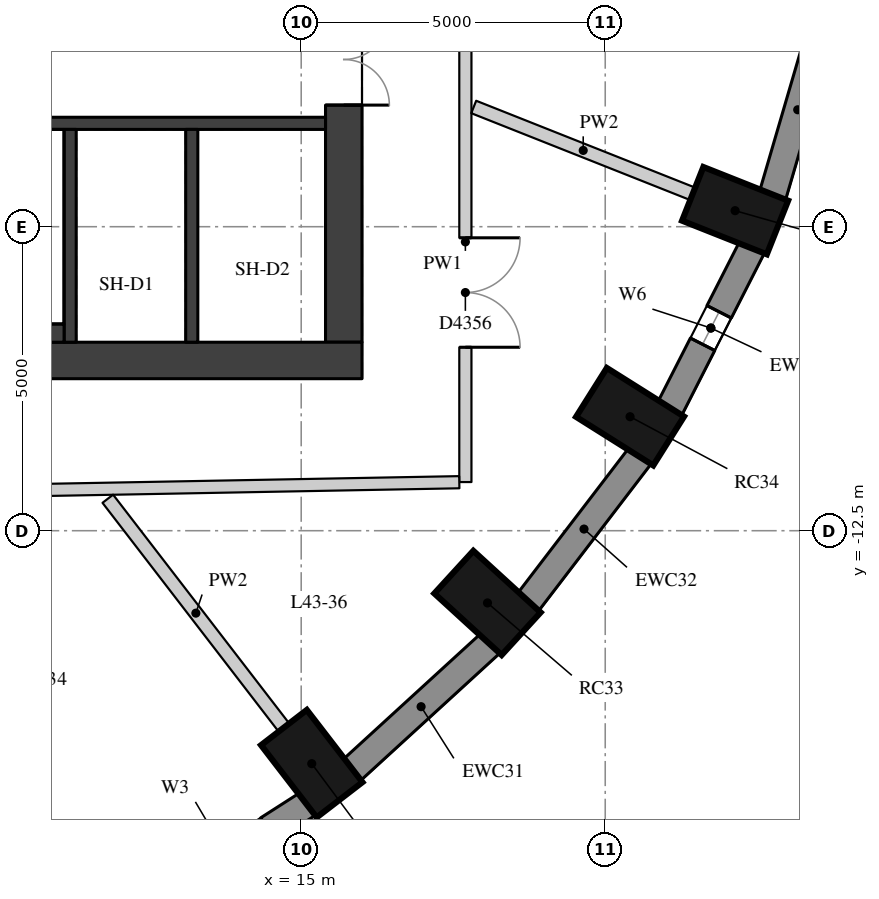
"""IFC4 building model, lengths in metres.
Left out: names, types, materials, properties, quantities, classifications, styles, units other than length and angle.
Written with IfcOpenShell. Run it as: python <this file> out.ifc"""

import sys

from ifc_helpers import new_model, si_unit, direction, frame, frame_2d, origin, origin_2d, place, context, subcontext, project, spatial, rectangle, extrude, element, fill, save


model = new_model("IFC4")
c1 = context("Model", 3, precision=1e-05, world=origin(), true_north=direction((0.0, 1.0)))
c2 = subcontext(c1, "Body", "Model", "MODEL_VIEW")
j1 = project(units=[si_unit("LENGTHUNIT", "METRE"), si_unit("PLANEANGLEUNIT", "RADIAN")], contexts=[c1])
p1 = place(None, origin())
s1 = spatial("IfcSite", under=j1, at=p1, CompositionType="ELEMENT")
p2 = place(p1, origin())
s2 = spatial("IfcBuilding", under=s1, at=p2, CompositionType="ELEMENT")
p3 = place(p2, frame((0.0, 0.0, 155.0)))
s3 = spatial("IfcBuildingStorey", under=s2, at=p3, CompositionType="ELEMENT", Elevation=155.0)
for number, where, z_axis, x_axis in (
    (1, (15.173, -16.332, 0.0), (0.0, 0.0, 1.0), (0.61, -0.792, 0.0)),
    (2, (18.064, -13.688, 0.0), (0.0, 0.0, 1.0), (0.738, -0.675, 0.0)),
    (3, (20.408, -10.625, 0.0), (0.0, 0.0, 1.0), (0.846, -0.533, 0.0)),
    (4, (22.136, -7.236, 0.0), (0.0, 0.0, 1.0), (0.93, -0.369, 0.0)),
):
    element("IfcColumn", number, at=place(p3, frame(where, z_axis=z_axis, x_axis=x_axis)), inside=s3, PredefinedType="COLUMN", context=c2, shape_type="SweptSolid", body=[
        extrude(rectangle(XDim=1.5, YDim=0.95, at=origin_2d()), origin(), (0.0, 0.0, 1.0), 3.3),
    ])
p4 = place(p3, frame((12.455, -18.693, 0.0), z_axis=(0.0, 0.0, 1.0), x_axis=(0.842065914439, 0.539374633943, 0.0)))
e5 = element("IfcWall", 5, at=p4, inside=s3, PredefinedType="SOLIDWALL", context=c2, shape_type="SweptSolid", body=[
    extrude(rectangle(XDim=3.151, YDim=0.45, at=frame_2d((1.576, 0.0))), origin(), (0.0, 0.0, 1.0), 3.02),
])
p5 = place(p4, frame((0.776, 0.0, 0.4)))
e6 = element("IfcOpeningElement", 6, at=p5, cuts=e5, PredefinedType="OPENING", context=c2, shape_type="SweptSolid", body=[
    extrude(rectangle(XDim=1.6, YDim=1.75, at=frame_2d((0.8, 0.875))), frame((0.0, 0.235, 0.0), z_axis=(0.0, -1.0, 0.0), x_axis=(1.0, 0.0, 0.0)), (0.0, 0.0, 1.0), 0.47),
])
p6 = place(p3, frame((15.83, -16.439, 0.0), z_axis=(0.0, 0.0, 1.0), x_axis=(0.737808755941, 0.675009807082, 0.0)))
e7 = element("IfcWall", 7, at=p6, inside=s3, PredefinedType="SOLIDWALL", context=c2, shape_type="SweptSolid", body=[
    extrude(rectangle(XDim=3.094, YDim=0.45, at=frame_2d((1.547, 0.0))), origin(), (0.0, 0.0, 1.0), 3.02),
])
p7 = place(p3, frame((18.728, -13.679, 0.0), z_axis=(0.0, 0.0, 1.0), x_axis=(0.607817056371, 0.794077090706, 0.0)))
e8 = element("IfcWall", 8, at=p7, inside=s3, PredefinedType="SOLIDWALL", context=c2, shape_type="SweptSolid", body=[
    extrude(rectangle(XDim=3.037, YDim=0.45, at=frame_2d((1.519, 0.0))), origin(), (0.0, 0.0, 1.0), 3.02),
])
p8 = place(p3, frame((21.059, -10.497, 0.0), z_axis=(0.0, 0.0, 1.0), x_axis=(0.454133999889, 0.890933392653, 0.0)))
e9 = element("IfcWall", 9, at=p8, inside=s3, PredefinedType="SOLIDWALL", context=c2, shape_type="SweptSolid", body=[
    extrude(rectangle(XDim=2.986, YDim=0.45, at=frame_2d((1.493, 0.0))), origin(), (0.0, 0.0, 1.0), 3.02),
])
p9 = place(p8, frame((1.193, 0.0, 0.4)))
e10 = element("IfcOpeningElement", 10, at=p9, cuts=e9, PredefinedType="OPENING", context=c2, shape_type="SweptSolid", body=[
    extrude(rectangle(XDim=0.6, YDim=1.75, at=frame_2d((0.3, 0.875))), frame((0.0, 0.235, 0.0), z_axis=(0.0, -1.0, 0.0), x_axis=(1.0, 0.0, 0.0)), (0.0, 0.0, 1.0), 0.47),
])
p10 = place(p3, frame((22.751, -6.991, 0.0), z_axis=(0.0, 0.0, 1.0), x_axis=(0.281049481624, 0.959693278542, 0.0)))
e11 = element("IfcWall", 11, at=p10, inside=s3, PredefinedType="SOLIDWALL", context=c2, shape_type="SweptSolid", body=[
    extrude(rectangle(XDim=2.948, YDim=0.45, at=frame_2d((1.474, 0.0))), origin(), (0.0, 0.0, 1.0), 3.02),
])
p11 = place(p3, frame((15.7, -9.4, 0.0), z_axis=(0.0, 0.0, 1.0), x_axis=(0.0, 1.0, 0.0)))
e12 = element("IfcWall", 12, at=p11, inside=s3, PredefinedType="SHEAR", context=c2, shape_type="SweptSolid", body=[
    extrude(rectangle(XDim=18.8, YDim=0.6, at=frame_2d((9.4, 0.0))), origin(), (0.0, 0.0, 1.0), 3.02),
])
p12 = place(p11, frame((13.4, 0.0, 0.0)))
e13 = element("IfcOpeningElement", 13, at=p12, cuts=e12, PredefinedType="OPENING", context=c2, shape_type="SweptSolid", body=[
    extrude(rectangle(XDim=1.5, YDim=2.1, at=frame_2d((0.75, 1.05))), frame((0.0, 0.31, 0.0), z_axis=(0.0, -1.0, 0.0), x_axis=(1.0, 0.0, 0.0)), (0.0, 0.0, 1.0), 0.62),
])
p13 = place(p11, frame((3.9, 0.0, 0.0)))
e14 = element("IfcOpeningElement", 14, at=p13, cuts=e12, PredefinedType="OPENING", context=c2, shape_type="SweptSolid", body=[
    extrude(rectangle(XDim=1.5, YDim=2.1, at=frame_2d((0.75, 1.05))), frame((0.0, 0.31, 0.0), z_axis=(0.0, -1.0, 0.0), x_axis=(1.0, 0.0, 0.0)), (0.0, 0.0, 1.0), 0.62),
])
p14 = place(p3, frame((4.0, -9.7, 0.0), z_axis=(0.0, 0.0, 1.0), x_axis=(1.0, 0.0, 0.0)))
e15 = element("IfcWall", 15, at=p14, inside=s3, PredefinedType="SHEAR", context=c2, shape_type="SweptSolid", body=[
    extrude(rectangle(XDim=12.0, YDim=0.6, at=frame_2d((6.0, 0.0))), origin(), (0.0, 0.0, 1.0), 3.02),
])
p15 = place(p3, frame((4.6, -5.8, 0.0), z_axis=(0.0, 0.0, 1.0), x_axis=(1.0, 0.0, 0.0)))
e16 = element("IfcWall", 16, at=p15, inside=s3, PredefinedType="SHEAR", context=c2, shape_type="SweptSolid", body=[
    extrude(rectangle(XDim=10.8, YDim=0.2, at=frame_2d((5.4, 0.0))), origin(), (0.0, 0.0, 1.0), 3.02),
])
for number, where, z_axis, x_axis in (
    (17, (11.2, -9.4, 0.0), (0.0, 0.0, 1.0), (0.0, 1.0, 0.0)),
    (18, (13.2, -9.4, 0.0), (0.0, 0.0, 1.0), (0.0, 1.0, 0.0)),
):
    element("IfcWall", number, at=place(p3, frame(where, z_axis=z_axis, x_axis=x_axis)), inside=s3, PredefinedType="SHEAR", context=c2, shape_type="SweptSolid", body=[
        extrude(rectangle(XDim=3.5, YDim=0.2, at=frame_2d((1.75, 0.0))), origin(), (0.0, 0.0, 1.0), 3.02),
    ])
p16 = place(p3, frame((6.22, -9.25, 0.0), z_axis=(0.0, 0.0, 1.0), x_axis=(1.0, 0.0, 0.0)))
e19 = element("IfcWall", 19, at=p16, inside=s3, PredefinedType="PARTITIONING", context=c2, shape_type="SweptSolid", body=[
    extrude(rectangle(XDim=4.88, YDim=0.3, at=frame_2d((2.44, 0.0))), origin(), (0.0, 0.0, 1.0), 3.02),
])
p17 = place(p3, frame((17.7, -3.8, 0.0), z_axis=(0.0, 0.0, 1.0), x_axis=(0.0, -1.0, 0.0)))
e20 = element("IfcWall", 20, at=p17, inside=s3, PredefinedType="PARTITIONING", context=c2, shape_type="SweptSolid", body=[
    extrude(rectangle(XDim=7.9, YDim=0.2, at=frame_2d((3.95, 0.0))), origin(), (0.0, 0.0, 1.0), 3.02),
])
p18 = place(p17, frame((3.883, 0.0, 0.0)))
e21 = element("IfcOpeningElement", 21, at=p18, cuts=e20, PredefinedType="OPENING", context=c2, shape_type="SweptSolid", body=[
    extrude(rectangle(XDim=1.8, YDim=2.1, at=frame_2d((0.9, 1.05))), frame((0.0, 0.11, 0.0), z_axis=(0.0, -1.0, 0.0), x_axis=(1.0, 0.0, 0.0)), (0.0, 0.0, 1.0), 0.22),
])
p19 = place(p3, frame((17.6, -11.702, 0.0), z_axis=(0.0, 0.0, 1.0), x_axis=(-0.999825923551, -0.018658043723, 0.0)))
e22 = element("IfcWall", 22, at=p19, inside=s3, PredefinedType="PARTITIONING", context=c2, shape_type="SweptSolid", body=[
    extrude(rectangle(XDim=22.899, YDim=0.2, at=frame_2d((11.449, 0.0))), origin(), (0.0, 0.0, 1.0), 3.02),
])
p20 = place(p19, frame((20.729, 0.0, 0.0)))
e23 = element("IfcOpeningElement", 23, at=p20, cuts=e22, PredefinedType="OPENING", context=c2, shape_type="SweptSolid", body=[
    extrude(rectangle(XDim=1.8, YDim=2.1, at=frame_2d((0.9, 1.05))), frame((0.0, 0.11, 0.0), z_axis=(0.0, -1.0, 0.0), x_axis=(1.0, 0.0, 0.0)), (0.0, 0.0, 1.0), 0.22),
])
p21 = place(p19, frame((14.554, 0.0, 0.0)))
e24 = element("IfcOpeningElement", 24, at=p21, cuts=e22, PredefinedType="OPENING", context=c2, shape_type="SweptSolid", body=[
    extrude(rectangle(XDim=1.1, YDim=2.1, at=frame_2d((0.55, 1.05))), frame((0.0, 0.11, 0.0), z_axis=(0.0, -1.0, 0.0), x_axis=(1.0, 0.0, 0.0)), (0.0, 0.0, 1.0), 0.22),
])
p22 = place(p19, frame((8.491, 0.0, 0.0)))
e25 = element("IfcOpeningElement", 25, at=p22, cuts=e22, PredefinedType="OPENING", context=c2, shape_type="SweptSolid", body=[
    extrude(rectangle(XDim=1.1, YDim=2.1, at=frame_2d((0.55, 1.05))), frame((0.0, 0.11, 0.0), z_axis=(0.0, -1.0, 0.0), x_axis=(1.0, 0.0, 0.0)), (0.0, 0.0, 1.0), 0.22),
])
p23 = place(p3, frame((14.716, -15.737, 0.0), z_axis=(0.0, 0.0, 1.0), x_axis=(-0.609964163419, 0.79242899956, 0.0)))
e26 = element("IfcWall", 26, at=p23, inside=s3, PredefinedType="PARTITIONING", context=c2, shape_type="SweptSolid", body=[
    extrude(rectangle(XDim=4.749, YDim=0.22, at=frame_2d((2.374, 0.0))), origin(), (0.0, 0.0, 1.0), 3.02),
])
p24 = place(p3, frame((21.439, -6.96, 0.0), z_axis=(0.0, 0.0, 1.0), x_axis=(-0.929511625875, 0.36879281089, 0.0)))
e27 = element("IfcWall", 27, at=p24, inside=s3, PredefinedType="PARTITIONING", context=c2, shape_type="SweptSolid", body=[
    extrude(rectangle(XDim=3.875, YDim=0.22, at=frame_2d((1.938, 0.0))), origin(), (0.0, 0.0, 1.0), 3.02),
])
p25 = place(p9, origin())
e28 = element("IfcWindow", 28, at=p25, inside=s3, PartitioningType="SINGLE_PANEL", PredefinedType="WINDOW", context=c2, shape_type="SweptSolid", body=[
    extrude(rectangle(XDim=0.6, YDim=1.75, at=frame_2d((0.3, 0.875))), frame((0.0, 0.035, 0.0), z_axis=(0.0, -1.0, 0.0), x_axis=(1.0, 0.0, 0.0)), (0.0, 0.0, 1.0), 0.06),
])
fill(e10, e28)
p26 = place(p13, origin())
e29 = element("IfcDoor", 29, at=p26, inside=s3, OperationType="DOUBLE_DOOR_SINGLE_SWING", PredefinedType="DOOR", context=c2, shape_type="SweptSolid", body=[
    extrude(rectangle(XDim=1.5, YDim=2.1, at=frame_2d((0.75, 1.05))), frame((0.0, 0.025, 0.0), z_axis=(0.0, -1.0, 0.0), x_axis=(1.0, 0.0, 0.0)), (0.0, 0.0, 1.0), 0.05),
])
fill(e14, e29)
p27 = place(p18, origin())
e30 = element("IfcDoor", 30, at=p27, inside=s3, OperationType="DOUBLE_DOOR_SINGLE_SWING", PredefinedType="DOOR", context=c2, shape_type="SweptSolid", body=[
    extrude(rectangle(XDim=1.8, YDim=2.1, at=frame_2d((0.9, 1.05))), frame((0.0, 0.025, 0.0), z_axis=(0.0, -1.0, 0.0), x_axis=(1.0, 0.0, 0.0)), (0.0, 0.0, 1.0), 0.05),
])
fill(e21, e30)
save(model, sys.argv[1])
